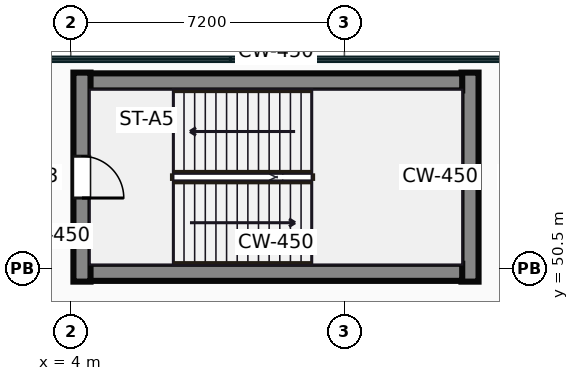
"""IFC4 building model, lengths in metres.
Left out: names, types, materials, properties, quantities, classifications, styles, units other than length and angle.
Written with IfcOpenShell. Run it as: python <this file> out.ifc"""

import sys

from ifc_helpers import new_model, si_unit, direction, frame, frame_2d, origin, place, context, subcontext, project, spatial, rectangle, extrude, source, transform, mapped, element, fill, save


model = new_model("IFC4")
c1 = context("Model", 3, precision=1e-05, world=origin(), true_north=direction((0.0, 1.0)))
c2 = subcontext(c1, "Body", "Model", "MODEL_VIEW")
j1 = project(units=[si_unit("LENGTHUNIT", "METRE"), si_unit("PLANEANGLEUNIT", "RADIAN")], contexts=[c1])
p1 = place(None, origin())
s1 = spatial("IfcSite", under=j1, at=p1, CompositionType="ELEMENT")
p2 = place(p1, origin())
s2 = spatial("IfcBuilding", under=s1, at=p2, CompositionType="ELEMENT")
p3 = place(p2, frame((0.0, 0.0, 11.0)))
s3 = spatial("IfcBuildingStorey", under=s2, at=p3, CompositionType="ELEMENT", Elevation=11.0)
m1 = source(origin(), c2, "Body", "SweptSolid", [
    extrude(rectangle(XDim=5.5, YDim=0.45, at=frame_2d((2.75, 0.0))), origin(), (0.0, 0.0, 1.0), 5.0),
])
p4 = place(p3, frame((4.295, 50.15, 0.0), z_axis=(0.0, 0.0, 1.0), x_axis=(0.0, 1.0, 0.0)))
e1 = element("IfcWall", 1, at=p4, inside=s3, PredefinedType="SHEAR", context=c2, shape_type="MappedRepresentation", body=[
    mapped(m1, transform((0.0, 0.0, 0.0))),
])
p5 = place(p4, frame((2.2, 0.0, 0.0)))
e2 = element("IfcOpeningElement", 2, at=p5, cuts=e1, PredefinedType="OPENING", context=c2, shape_type="SweptSolid", body=[
    extrude(rectangle(XDim=1.1, YDim=2.15, at=frame_2d((0.55, 1.075))), frame((0.0, 0.235, 0.0), z_axis=(0.0, -1.0, 0.0), x_axis=(1.0, 0.0, 0.0)), (0.0, 0.0, 1.0), 0.47),
])
m2 = source(origin(), c2, "Body", "SweptSolid", [
    extrude(rectangle(XDim=9.8, YDim=0.45, at=frame_2d((4.9, 0.0))), origin(), (0.0, 0.0, 1.0), 5.0),
])
for number, where, z_axis, x_axis in (
    (3, (4.5, 50.395, 0.0), (0.0, 0.0, 1.0), (1.0, 0.0, 0.0)),
    (4, (4.5, 55.405, 0.0), (0.0, 0.0, 1.0), (1.0, 0.0, 0.0)),
):
    element("IfcWall", number, at=place(p3, frame(where, z_axis=z_axis, x_axis=x_axis)), inside=s3, PredefinedType="SHEAR", context=c2, shape_type="MappedRepresentation", body=[
        mapped(m2, transform((0.0, 0.0, 0.0))),
    ])
p6 = place(p3, frame((14.505, 50.15, 0.0), z_axis=(0.0, 0.0, 1.0), x_axis=(0.0, 1.0, 0.0)))
e5 = element("IfcWall", 5, at=p6, inside=s3, PredefinedType="SHEAR", context=c2, shape_type="MappedRepresentation", body=[
    mapped(m1, transform((0.0, 0.0, 0.0))),
])
m3 = source(origin(), c2, "Body", "SweptSolid", [
    extrude(rectangle(XDim=1.1, YDim=2.15, at=frame_2d((0.55, 1.075))), frame((0.0, 0.025, 0.0), z_axis=(0.0, -1.0, 0.0), x_axis=(1.0, 0.0, 0.0)), (0.0, 0.0, 1.0), 0.05),
])
p7 = place(p5, frame((1.1, 0.0, 0.0), z_axis=(0.0, 0.0, 1.0), x_axis=(-1.0, 0.0, 0.0)))
e6 = element("IfcDoor", 6, at=p7, inside=s3, OperationType="SINGLE_SWING_LEFT", PredefinedType="DOOR", context=c2, shape_type="MappedRepresentation", body=[
    mapped(m3, transform((0.0, 0.0, 0.0))),
])
fill(e2, e6)
save(model, sys.argv[1])
